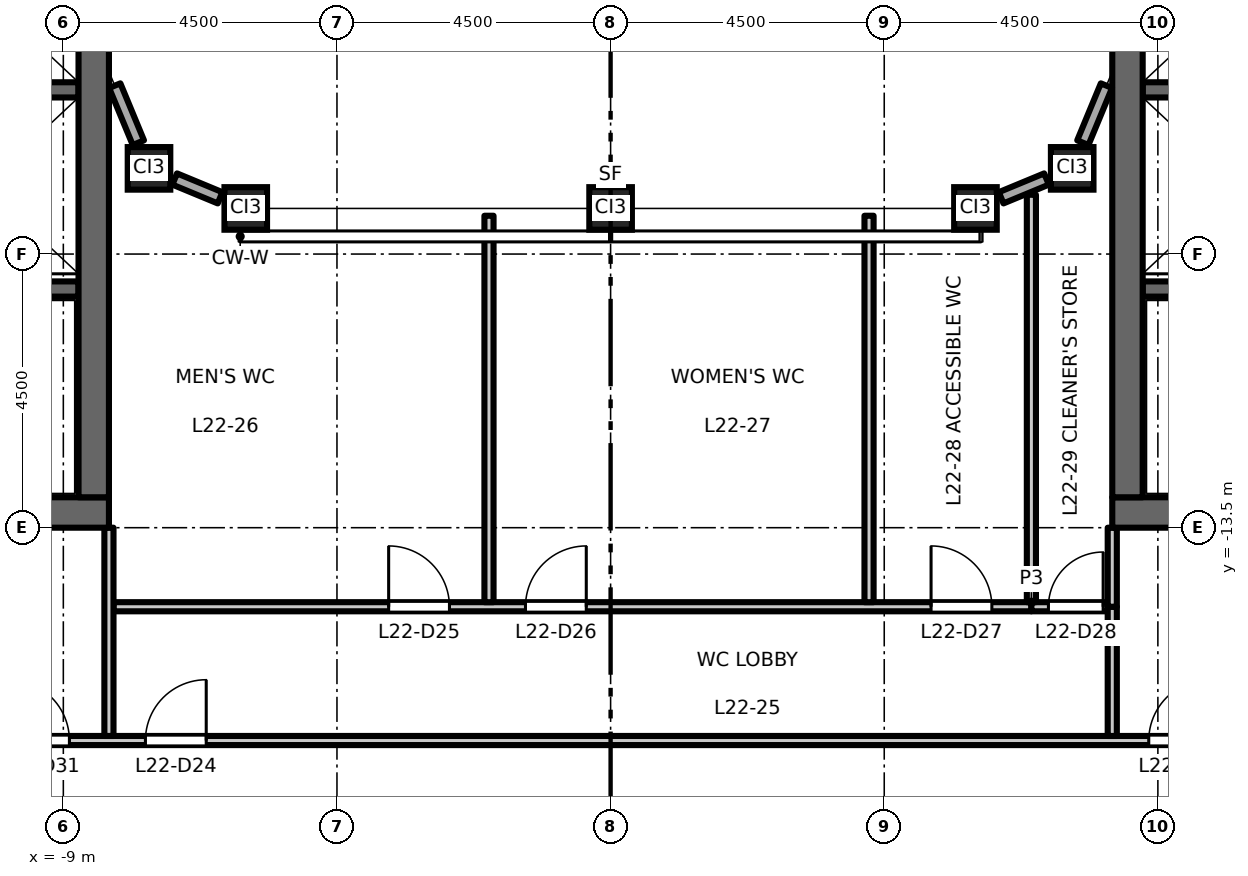
"""IFC4 building model, lengths in metres.
Left out: names, types, materials, properties, quantities, classifications, styles, units other than length and angle.
Written with IfcOpenShell. Run it as: python <this file> out.ifc"""

import sys

from ifc_helpers import new_model, si_unit, direction, frame, frame_2d, origin, origin_2d, place, context, subcontext, project, spatial, rectangle, hollow_rectangle, extrude, element, fill, save


model = new_model("IFC4")
c1 = context("Model", 3, precision=1e-05, world=origin(), true_north=direction((0.0, 1.0)))
c2 = subcontext(c1, "Body", "Model", "MODEL_VIEW")
j1 = project(units=[si_unit("LENGTHUNIT", "METRE"), si_unit("PLANEANGLEUNIT", "RADIAN")], contexts=[c1])
p1 = place(None, origin())
s1 = spatial("IfcSite", under=j1, at=p1, CompositionType="ELEMENT")
p2 = place(p1, origin())
s2 = spatial("IfcBuilding", under=s1, at=p2, CompositionType="ELEMENT")
p3 = place(p2, frame((0.0, 0.0, 104.7)))
s3 = spatial("IfcBuildingStorey", under=s2, at=p3, CompositionType="ELEMENT", Elevation=104.7)
for number, where, z_axis, x_axis in (
    (1, (-7.591, -7.591, 0.0), (0.0, 0.0, 1.0), (1.0, 0.0, 0.0)),
    (2, (-6.0, -8.25, 0.0), (0.0, 0.0, 1.0), (1.0, 0.0, 0.0)),
    (3, (0.0, -8.25, 0.0), (0.0, 0.0, 1.0), (1.0, 0.0, 0.0)),
    (4, (6.0, -8.25, 0.0), (0.0, 0.0, 1.0), (1.0, 0.0, 0.0)),
    (5, (7.591, -7.591, 0.0), (0.0, 0.0, 1.0), (1.0, 0.0, 0.0)),
):
    element("IfcColumn", number, at=place(p3, frame(where, z_axis=z_axis, x_axis=x_axis)), inside=s3, PredefinedType="COLUMN", context=c2, shape_type="SweptSolid", body=[
        extrude(hollow_rectangle(XDim=0.7, YDim=0.7, WallThickness=0.04, at=origin_2d()), origin(), (0.0, 0.0, 1.0), 4.5),
    ])
p4 = place(p3, frame((-8.75, -6.3, 0.0), z_axis=(0.0, 0.0, 1.0), x_axis=(-1.0, 0.0, 0.0)))
e6 = element("IfcWall", 6, at=p4, inside=s3, PredefinedType="SHEAR", context=c2, shape_type="SweptSolid", body=[
    extrude(rectangle(XDim=3.1, YDim=0.25, at=frame_2d((1.55, 0.0))), origin(), (0.0, 0.0, 1.0), 4.35),
])
p5 = place(p3, frame((-8.75, -9.575, 0.0), z_axis=(0.0, 0.0, 1.0), x_axis=(-1.0, 0.0, 0.0)))
e7 = element("IfcWall", 7, at=p5, inside=s3, PredefinedType="SHEAR", context=c2, shape_type="SweptSolid", body=[
    extrude(rectangle(XDim=8.0, YDim=0.25, at=frame_2d((4.0, 0.0))), origin(), (0.0, 0.0, 1.0), 4.35),
])
p6 = place(p5, frame((6.65, 0.0, 0.0)))
e8 = element("IfcOpeningElement", 8, at=p6, cuts=e7, PredefinedType="OPENING", context=c2, shape_type="SweptSolid", body=[
    extrude(rectangle(XDim=1.1, YDim=2.1, at=frame_2d((0.55, 1.05))), frame((0.0, 0.135, 0.0), z_axis=(0.0, -1.0, 0.0), x_axis=(1.0, 0.0, 0.0)), (0.0, 0.0, 1.0), 0.27),
])
p7 = place(p3, frame((-8.25, -13.25, 0.0), z_axis=(0.0, 0.0, 1.0), x_axis=(-1.0, 0.0, 0.0)))
e9 = element("IfcWall", 9, at=p7, inside=s3, PredefinedType="SHEAR", context=c2, shape_type="SweptSolid", body=[
    extrude(rectangle(XDim=13.5, YDim=0.5, at=frame_2d((6.75, 0.0))), origin(), (0.0, 0.0, 1.0), 4.35),
])
p8 = place(p3, frame((-8.5, -13.0, 0.0), z_axis=(0.0, 0.0, 1.0), x_axis=(0.0, 1.0, 0.0)))
e10 = element("IfcWall", 10, at=p8, inside=s3, PredefinedType="SHEAR", context=c2, shape_type="SweptSolid", body=[
    extrude(rectangle(XDim=26.0, YDim=0.5, at=frame_2d((13.0, 0.0))), origin(), (0.0, 0.0, 1.0), 4.35),
])
p9 = place(p3, frame((8.75, -6.3, 0.0), z_axis=(0.0, 0.0, 1.0), x_axis=(1.0, 0.0, 0.0)))
e11 = element("IfcWall", 11, at=p9, inside=s3, PredefinedType="SHEAR", context=c2, shape_type="SweptSolid", body=[
    extrude(rectangle(XDim=3.1, YDim=0.25, at=frame_2d((1.55, 0.0))), origin(), (0.0, 0.0, 1.0), 4.35),
])
p10 = place(p3, frame((8.75, -9.575, 0.0), z_axis=(0.0, 0.0, 1.0), x_axis=(1.0, 0.0, 0.0)))
e12 = element("IfcWall", 12, at=p10, inside=s3, PredefinedType="SHEAR", context=c2, shape_type="SweptSolid", body=[
    extrude(rectangle(XDim=8.0, YDim=0.25, at=frame_2d((4.0, 0.0))), origin(), (0.0, 0.0, 1.0), 4.35),
])
p11 = place(p10, frame((6.65, 0.0, 0.0)))
e13 = element("IfcOpeningElement", 13, at=p11, cuts=e12, PredefinedType="OPENING", context=c2, shape_type="SweptSolid", body=[
    extrude(rectangle(XDim=1.1, YDim=2.1, at=frame_2d((0.55, 1.05))), frame((0.0, 0.135, 0.0), z_axis=(0.0, -1.0, 0.0), x_axis=(1.0, 0.0, 0.0)), (0.0, 0.0, 1.0), 0.27),
])
p12 = place(p3, frame((8.25, -13.25, 0.0), z_axis=(0.0, 0.0, 1.0), x_axis=(1.0, 0.0, 0.0)))
e14 = element("IfcWall", 14, at=p12, inside=s3, PredefinedType="SHEAR", context=c2, shape_type="SweptSolid", body=[
    extrude(rectangle(XDim=13.5, YDim=0.5, at=frame_2d((6.75, 0.0))), origin(), (0.0, 0.0, 1.0), 4.35),
])
p13 = place(p3, frame((8.5, -13.0, 0.0), z_axis=(0.0, 0.0, 1.0), x_axis=(0.0, 1.0, 0.0)))
e15 = element("IfcWall", 15, at=p13, inside=s3, PredefinedType="SHEAR", context=c2, shape_type="SweptSolid", body=[
    extrude(rectangle(XDim=26.0, YDim=0.5, at=frame_2d((13.0, 0.0))), origin(), (0.0, 0.0, 1.0), 4.35),
])
p14 = place(p3, frame((6.423, -8.075, 0.0), z_axis=(0.0, 0.0, 1.0), x_axis=(0.923817771127, 0.382832503518, 0.0)))
e16 = element("IfcWall", 16, at=p14, inside=s3, PredefinedType="STANDARD", context=c2, shape_type="SweptSolid", body=[
    extrude(rectangle(XDim=0.807, YDim=0.2, at=frame_2d((0.404, 0.0))), origin(), (0.0, 0.0, 1.0), 3.826),
])
for number, where, z_axis, x_axis in (
    (17, (7.766, -7.168, 0.0), (0.0, 0.0, 1.0), (0.383, 0.924, 0.0)),
    (18, (-8.154, -6.231, 0.0), (0.0, 0.0, 1.0), (0.383, -0.924, 0.0)),
):
    element("IfcWall", number, at=place(p3, frame(where, z_axis=z_axis, x_axis=x_axis)), inside=s3, PredefinedType="STANDARD", context=c2, shape_type="SweptSolid", body=[
        extrude(rectangle(XDim=1.015, YDim=0.2, at=frame_2d((0.507, 0.0))), origin(), (0.0, 0.0, 1.0), 3.826),
    ])
p15 = place(p3, frame((-7.168, -7.766, 0.0), z_axis=(0.0, 0.0, 1.0), x_axis=(0.923817771127, -0.382832503518, 0.0)))
e19 = element("IfcWall", 19, at=p15, inside=s3, PredefinedType="STANDARD", context=c2, shape_type="SweptSolid", body=[
    extrude(rectangle(XDim=0.807, YDim=0.2, at=frame_2d((0.404, 0.0))), origin(), (0.0, 0.0, 1.0), 3.826),
])
p16 = place(p3, frame((-21.825, -17.0, 0.0), z_axis=(0.0, 0.0, 1.0), x_axis=(1.0, 0.0, 0.0)))
e20 = element("IfcWall", 20, at=p16, inside=s3, PredefinedType="PARTITIONING", context=c2, shape_type="SweptSolid", body=[
    extrude(rectangle(XDim=43.65, YDim=0.15, at=frame_2d((21.825, 0.0))), origin(), (0.0, 0.0, 1.0), 4.35),
])
p17 = place(p16, frame((14.175, 0.0, 0.0)))
e21 = element("IfcOpeningElement", 21, at=p17, cuts=e20, PredefinedType="OPENING", context=c2, shape_type="SweptSolid", body=[
    extrude(rectangle(XDim=1.0, YDim=2.1, at=frame_2d((0.5, 1.05))), frame((0.0, 0.085, 0.0), z_axis=(0.0, -1.0, 0.0), x_axis=(1.0, 0.0, 0.0)), (0.0, 0.0, 1.0), 0.17),
])
p18 = place(p16, frame((11.925, 0.0, 0.0)))
e22 = element("IfcOpeningElement", 22, at=p18, cuts=e20, PredefinedType="OPENING", context=c2, shape_type="SweptSolid", body=[
    extrude(rectangle(XDim=1.0, YDim=2.1, at=frame_2d((0.5, 1.05))), frame((0.0, 0.085, 0.0), z_axis=(0.0, -1.0, 0.0), x_axis=(1.0, 0.0, 0.0)), (0.0, 0.0, 1.0), 0.17),
])
p19 = place(p16, frame((30.675, 0.0, 0.0)))
e23 = element("IfcOpeningElement", 23, at=p19, cuts=e20, PredefinedType="OPENING", context=c2, shape_type="SweptSolid", body=[
    extrude(rectangle(XDim=1.0, YDim=2.1, at=frame_2d((0.5, 1.05))), frame((0.0, 0.085, 0.0), z_axis=(0.0, -1.0, 0.0), x_axis=(1.0, 0.0, 0.0)), (0.0, 0.0, 1.0), 0.17),
])
p20 = place(p3, frame((-8.175, -14.8, 0.0), z_axis=(0.0, 0.0, 1.0), x_axis=(1.0, 0.0, 0.0)))
e24 = element("IfcWall", 24, at=p20, inside=s3, PredefinedType="PARTITIONING", context=c2, shape_type="SweptSolid", body=[
    extrude(rectangle(XDim=15.095, YDim=0.15, at=frame_2d((7.547, 0.0))), origin(), (0.0, 0.0, 1.0), 4.35),
])
p21 = place(p20, frame((4.525, 0.0, 0.0)))
e25 = element("IfcOpeningElement", 25, at=p21, cuts=e24, PredefinedType="OPENING", context=c2, shape_type="SweptSolid", body=[
    extrude(rectangle(XDim=1.0, YDim=2.1, at=frame_2d((0.5, 1.05))), frame((0.0, 0.085, 0.0), z_axis=(0.0, -1.0, 0.0), x_axis=(1.0, 0.0, 0.0)), (0.0, 0.0, 1.0), 0.17),
])
p22 = place(p20, frame((6.775, 0.0, 0.0)))
e26 = element("IfcOpeningElement", 26, at=p22, cuts=e24, PredefinedType="OPENING", context=c2, shape_type="SweptSolid", body=[
    extrude(rectangle(XDim=1.0, YDim=2.1, at=frame_2d((0.5, 1.05))), frame((0.0, 0.085, 0.0), z_axis=(0.0, -1.0, 0.0), x_axis=(1.0, 0.0, 0.0)), (0.0, 0.0, 1.0), 0.17),
])
p23 = place(p20, frame((13.445, 0.0, 0.0)))
e27 = element("IfcOpeningElement", 27, at=p23, cuts=e24, PredefinedType="OPENING", context=c2, shape_type="SweptSolid", body=[
    extrude(rectangle(XDim=1.0, YDim=2.1, at=frame_2d((0.5, 1.05))), frame((0.0, 0.085, 0.0), z_axis=(0.0, -1.0, 0.0), x_axis=(1.0, 0.0, 0.0)), (0.0, 0.0, 1.0), 0.17),
])
p24 = place(p3, frame((6.92, -14.8, 0.0), z_axis=(0.0, 0.0, 1.0), x_axis=(1.0, 0.0, 0.0)))
e28 = element("IfcWall", 28, at=p24, inside=s3, PredefinedType="PARTITIONING", context=c2, shape_type="SweptSolid", body=[
    extrude(rectangle(XDim=1.255, YDim=0.15, at=frame_2d((0.627, 0.0))), origin(), (0.0, 0.0, 1.0), 4.35),
])
p25 = place(p24, frame((0.28, 0.0, 0.0)))
e29 = element("IfcOpeningElement", 29, at=p25, cuts=e28, PredefinedType="OPENING", context=c2, shape_type="SweptSolid", body=[
    extrude(rectangle(XDim=0.9, YDim=2.1, at=frame_2d((0.45, 1.05))), frame((0.0, 0.085, 0.0), z_axis=(0.0, -1.0, 0.0), x_axis=(1.0, 0.0, 0.0)), (0.0, 0.0, 1.0), 0.17),
])
p26 = place(p3, frame((-8.25, -16.925, 0.0), z_axis=(0.0, 0.0, 1.0), x_axis=(0.0, 1.0, 0.0)))
e30 = element("IfcWall", 30, at=p26, inside=s3, PredefinedType="PARTITIONING", context=c2, shape_type="SweptSolid", body=[
    extrude(rectangle(XDim=3.425, YDim=0.15, at=frame_2d((1.712, 0.0))), origin(), (0.0, 0.0, 1.0), 4.35),
])
for number, where, z_axis, x_axis in (
    (31, (-2.0, -14.725, 0.0), (0.0, 0.0, 1.0), (0.0, 1.0, 0.0)),
    (32, (4.25, -14.725, 0.0), (0.0, 0.0, 1.0), (0.0, 1.0, 0.0)),
):
    element("IfcWall", number, at=place(p3, frame(where, z_axis=z_axis, x_axis=x_axis)), inside=s3, PredefinedType="PARTITIONING", context=c2, shape_type="SweptSolid", body=[
        extrude(rectangle(XDim=6.355, YDim=0.15, at=frame_2d((3.177, 0.0))), origin(), (0.0, 0.0, 1.0), 4.35),
    ])
p27 = place(p3, frame((6.92, -14.725, 0.0), z_axis=(0.0, 0.0, 1.0), x_axis=(0.0, 1.0, 0.0)))
e33 = element("IfcWall", 33, at=p27, inside=s3, PredefinedType="PARTITIONING", context=c2, shape_type="SweptSolid", body=[
    extrude(rectangle(XDim=6.7, YDim=0.15, at=frame_2d((3.35, 0.0))), origin(), (0.0, 0.0, 1.0), 4.35),
])
p28 = place(p3, frame((8.25, -16.925, 0.0), z_axis=(0.0, 0.0, 1.0), x_axis=(0.0, 1.0, 0.0)))
e34 = element("IfcWall", 34, at=p28, inside=s3, PredefinedType="PARTITIONING", context=c2, shape_type="SweptSolid", body=[
    extrude(rectangle(XDim=2.125, YDim=0.15, at=frame_2d((1.062, 0.0))), origin(), (0.0, 0.0, 1.0), 4.35),
])
p29 = place(p3, frame((8.25, -14.8, 0.0), z_axis=(0.0, 0.0, 1.0), x_axis=(0.0, 1.0, 0.0)))
e35 = element("IfcWall", 35, at=p29, inside=s3, PredefinedType="PARTITIONING", context=c2, shape_type="SweptSolid", body=[
    extrude(rectangle(XDim=1.3, YDim=0.15, at=frame_2d((0.65, 0.0))), origin(), (0.0, 0.0, 1.0), 4.35),
])
p30 = place(p17, origin())
e36 = element("IfcDoor", 36, at=p30, inside=s3, OperationType="SINGLE_SWING_RIGHT", PredefinedType="DOOR", context=c2, shape_type="SweptSolid", body=[
    extrude(rectangle(XDim=1.0, YDim=2.1, at=frame_2d((0.5, 1.05))), frame((0.0, 0.025, 0.0), z_axis=(0.0, -1.0, 0.0), x_axis=(1.0, 0.0, 0.0)), (0.0, 0.0, 1.0), 0.05),
])
fill(e21, e36)
p31 = place(p21, origin())
e37 = element("IfcDoor", 37, at=p31, inside=s3, OperationType="SINGLE_SWING_LEFT", PredefinedType="DOOR", context=c2, shape_type="SweptSolid", body=[
    extrude(rectangle(XDim=1.0, YDim=2.1, at=frame_2d((0.5, 1.05))), frame((0.0, 0.025, 0.0), z_axis=(0.0, -1.0, 0.0), x_axis=(1.0, 0.0, 0.0)), (0.0, 0.0, 1.0), 0.05),
])
fill(e25, e37)
p32 = place(p22, origin())
e38 = element("IfcDoor", 38, at=p32, inside=s3, OperationType="SINGLE_SWING_RIGHT", PredefinedType="DOOR", context=c2, shape_type="SweptSolid", body=[
    extrude(rectangle(XDim=1.0, YDim=2.1, at=frame_2d((0.5, 1.05))), frame((0.0, 0.025, 0.0), z_axis=(0.0, -1.0, 0.0), x_axis=(1.0, 0.0, 0.0)), (0.0, 0.0, 1.0), 0.05),
])
fill(e26, e38)
p33 = place(p23, origin())
e39 = element("IfcDoor", 39, at=p33, inside=s3, OperationType="SINGLE_SWING_LEFT", PredefinedType="DOOR", context=c2, shape_type="SweptSolid", body=[
    extrude(rectangle(XDim=1.0, YDim=2.1, at=frame_2d((0.5, 1.05))), frame((0.0, 0.025, 0.0), z_axis=(0.0, -1.0, 0.0), x_axis=(1.0, 0.0, 0.0)), (0.0, 0.0, 1.0), 0.05),
])
fill(e27, e39)
p34 = place(p25, origin())
e40 = element("IfcDoor", 40, at=p34, inside=s3, OperationType="SINGLE_SWING_RIGHT", PredefinedType="DOOR", context=c2, shape_type="SweptSolid", body=[
    extrude(rectangle(XDim=0.9, YDim=2.1, at=frame_2d((0.45, 1.05))), frame((0.0, 0.025, 0.0), z_axis=(0.0, -1.0, 0.0), x_axis=(1.0, 0.0, 0.0)), (0.0, 0.0, 1.0), 0.05),
])
fill(e29, e40)
p35 = place(p18, origin())
e41 = element("IfcDoor", 41, at=p35, inside=s3, OperationType="SINGLE_SWING_LEFT", PredefinedType="DOOR", context=c2, shape_type="SweptSolid", body=[
    extrude(rectangle(XDim=1.0, YDim=2.1, at=frame_2d((0.5, 1.05))), frame((0.0, 0.025, 0.0), z_axis=(0.0, -1.0, 0.0), x_axis=(1.0, 0.0, 0.0)), (0.0, 0.0, 1.0), 0.05),
])
fill(e22, e41)
p36 = place(p19, origin())
e42 = element("IfcDoor", 42, at=p36, inside=s3, OperationType="SINGLE_SWING_RIGHT", PredefinedType="DOOR", context=c2, shape_type="SweptSolid", body=[
    extrude(rectangle(XDim=1.0, YDim=2.1, at=frame_2d((0.5, 1.05))), frame((0.0, 0.025, 0.0), z_axis=(0.0, -1.0, 0.0), x_axis=(1.0, 0.0, 0.0)), (0.0, 0.0, 1.0), 0.05),
])
fill(e23, e42)
save(model, sys.argv[1])
